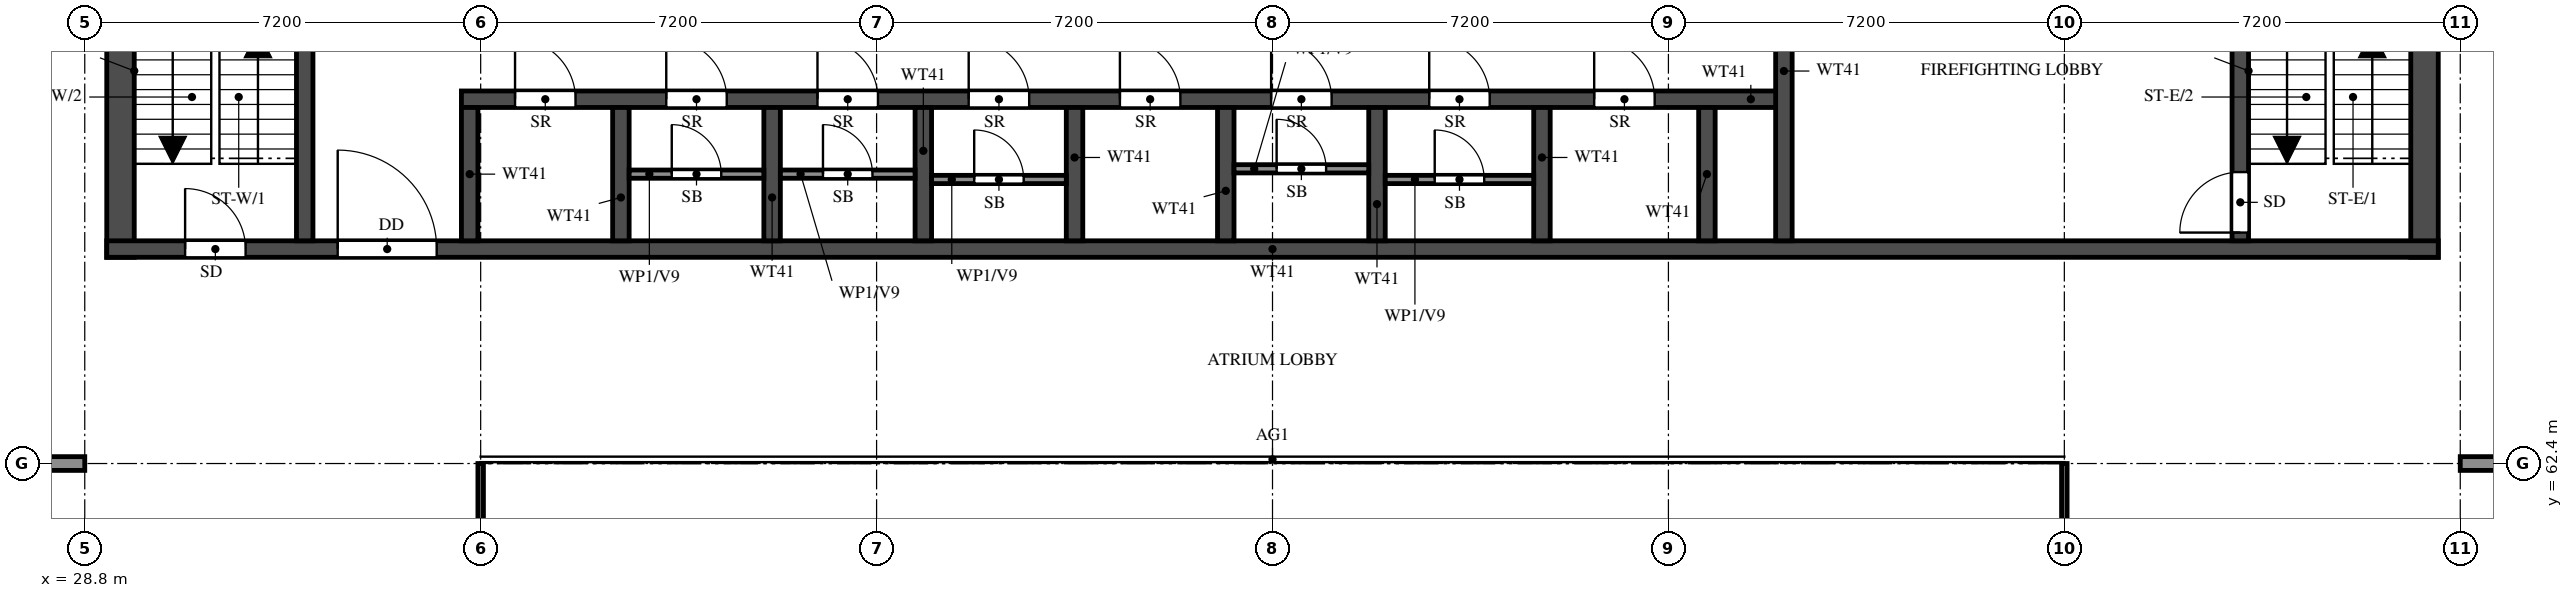
"""IFC4 building model, lengths in metres.
Left out: names, types, materials, properties, quantities, classifications, styles, units other than length and angle.
Written with IfcOpenShell. Run it as: python <this file> out.ifc"""

import sys

from ifc_helpers import new_model, si_unit, direction, frame, frame_2d, origin, place, context, subcontext, project, spatial, rectangle, extrude, element, fill, save


model = new_model("IFC4")
c1 = context("Model", 3, precision=1e-05, world=origin(), true_north=direction((0.0, 1.0)))
c2 = subcontext(c1, "Body", "Model", "MODEL_VIEW")
j1 = project(units=[si_unit("LENGTHUNIT", "METRE"), si_unit("PLANEANGLEUNIT", "RADIAN")], contexts=[c1])
p1 = place(None, origin())
s1 = spatial("IfcSite", under=j1, at=p1, CompositionType="ELEMENT")
p2 = place(p1, origin())
s2 = spatial("IfcBuilding", under=s1, at=p2, CompositionType="ELEMENT")
p3 = place(p2, frame((0.0, 0.0, 271.0)))
s3 = spatial("IfcBuildingStorey", under=s2, at=p3, CompositionType="ELEMENT", Elevation=271.0)
for number, where, z_axis, x_axis in (
    (1, (29.45, 66.15, 0.0), (0.0, 0.0, 1.0), (0.0, 1.0, 0.0)),
    (2, (71.35, 66.15, 0.0), (0.0, 0.0, 1.0), (0.0, 1.0, 0.0)),
):
    element("IfcWall", number, at=place(p3, frame(where, z_axis=z_axis, x_axis=x_axis)), inside=s3, PredefinedType="SHEAR", context=c2, shape_type="SweptSolid", body=[
        extrude(rectangle(XDim=11.85, YDim=0.5, at=frame_2d((5.925, 0.0))), origin(), (0.0, 0.0, 1.0), 3.15),
    ])
p4 = place(p3, frame((29.2, 66.3, 0.0), z_axis=(0.0, 0.0, 1.0), x_axis=(1.0, 0.0, 0.0)))
e3 = element("IfcWall", 3, at=p4, inside=s3, PredefinedType="SHEAR", context=c2, shape_type="SweptSolid", body=[
    extrude(rectangle(XDim=42.4, YDim=0.3, at=frame_2d((21.2, 0.0))), origin(), (0.0, 0.0, 1.0), 3.15),
])
p5 = place(p4, frame((1.425, 0.0, 0.0)))
e4 = element("IfcOpeningElement", 4, at=p5, cuts=e3, PredefinedType="OPENING", context=c2, shape_type="SweptSolid", body=[
    extrude(rectangle(XDim=1.1, YDim=2.1, at=frame_2d((0.55, 1.05))), frame((0.0, 0.16, 0.0), z_axis=(0.0, -1.0, 0.0), x_axis=(1.0, 0.0, 0.0)), (0.0, 0.0, 1.0), 0.32),
])
p6 = place(p4, frame((4.2, 0.0, 0.0)))
e5 = element("IfcOpeningElement", 5, at=p6, cuts=e3, PredefinedType="OPENING", context=c2, shape_type="SweptSolid", body=[
    extrude(rectangle(XDim=1.8, YDim=2.1, at=frame_2d((0.9, 1.05))), frame((0.0, 0.16, 0.0), z_axis=(0.0, -1.0, 0.0), x_axis=(1.0, 0.0, 0.0)), (0.0, 0.0, 1.0), 0.32),
])
p7 = place(p3, frame((35.65, 69.025, 0.0), z_axis=(0.0, 0.0, 1.0), x_axis=(1.0, 0.0, 0.0)))
e6 = element("IfcWall", 6, at=p7, inside=s3, PredefinedType="SHEAR", context=c2, shape_type="SweptSolid", body=[
    extrude(rectangle(XDim=24.05, YDim=0.3, at=frame_2d((12.025, 0.0))), origin(), (0.0, 0.0, 1.0), 3.15),
])
p8 = place(p7, frame((0.975, 0.0, 0.0)))
e7 = element("IfcOpeningElement", 7, at=p8, cuts=e6, PredefinedType="OPENING", context=c2, shape_type="SweptSolid", body=[
    extrude(rectangle(XDim=1.1, YDim=2.1, at=frame_2d((0.55, 1.05))), frame((0.0, 0.16, 0.0), z_axis=(0.0, -1.0, 0.0), x_axis=(1.0, 0.0, 0.0)), (0.0, 0.0, 1.0), 0.32),
])
p9 = place(p7, frame((3.725, 0.0, 0.0)))
e8 = element("IfcOpeningElement", 8, at=p9, cuts=e6, PredefinedType="OPENING", context=c2, shape_type="SweptSolid", body=[
    extrude(rectangle(XDim=1.1, YDim=2.1, at=frame_2d((0.55, 1.05))), frame((0.0, 0.16, 0.0), z_axis=(0.0, -1.0, 0.0), x_axis=(1.0, 0.0, 0.0)), (0.0, 0.0, 1.0), 0.32),
])
p10 = place(p7, frame((6.475, 0.0, 0.0)))
e9 = element("IfcOpeningElement", 9, at=p10, cuts=e6, PredefinedType="OPENING", context=c2, shape_type="SweptSolid", body=[
    extrude(rectangle(XDim=1.1, YDim=2.1, at=frame_2d((0.55, 1.05))), frame((0.0, 0.16, 0.0), z_axis=(0.0, -1.0, 0.0), x_axis=(1.0, 0.0, 0.0)), (0.0, 0.0, 1.0), 0.32),
])
p11 = place(p7, frame((9.225, 0.0, 0.0)))
e10 = element("IfcOpeningElement", 10, at=p11, cuts=e6, PredefinedType="OPENING", context=c2, shape_type="SweptSolid", body=[
    extrude(rectangle(XDim=1.1, YDim=2.1, at=frame_2d((0.55, 1.05))), frame((0.0, 0.16, 0.0), z_axis=(0.0, -1.0, 0.0), x_axis=(1.0, 0.0, 0.0)), (0.0, 0.0, 1.0), 0.32),
])
p12 = place(p7, frame((11.975, 0.0, 0.0)))
e11 = element("IfcOpeningElement", 11, at=p12, cuts=e6, PredefinedType="OPENING", context=c2, shape_type="SweptSolid", body=[
    extrude(rectangle(XDim=1.1, YDim=2.1, at=frame_2d((0.55, 1.05))), frame((0.0, 0.16, 0.0), z_axis=(0.0, -1.0, 0.0), x_axis=(1.0, 0.0, 0.0)), (0.0, 0.0, 1.0), 0.32),
])
p13 = place(p7, frame((14.725, 0.0, 0.0)))
e12 = element("IfcOpeningElement", 12, at=p13, cuts=e6, PredefinedType="OPENING", context=c2, shape_type="SweptSolid", body=[
    extrude(rectangle(XDim=1.1, YDim=2.1, at=frame_2d((0.55, 1.05))), frame((0.0, 0.16, 0.0), z_axis=(0.0, -1.0, 0.0), x_axis=(1.0, 0.0, 0.0)), (0.0, 0.0, 1.0), 0.32),
])
p14 = place(p7, frame((17.6, 0.0, 0.0)))
e13 = element("IfcOpeningElement", 13, at=p14, cuts=e6, PredefinedType="OPENING", context=c2, shape_type="SweptSolid", body=[
    extrude(rectangle(XDim=1.1, YDim=2.1, at=frame_2d((0.55, 1.05))), frame((0.0, 0.16, 0.0), z_axis=(0.0, -1.0, 0.0), x_axis=(1.0, 0.0, 0.0)), (0.0, 0.0, 1.0), 0.32),
])
p15 = place(p7, frame((20.6, 0.0, 0.0)))
e14 = element("IfcOpeningElement", 14, at=p15, cuts=e6, PredefinedType="OPENING", context=c2, shape_type="SweptSolid", body=[
    extrude(rectangle(XDim=1.1, YDim=2.1, at=frame_2d((0.55, 1.05))), frame((0.0, 0.16, 0.0), z_axis=(0.0, -1.0, 0.0), x_axis=(1.0, 0.0, 0.0)), (0.0, 0.0, 1.0), 0.32),
])
p16 = place(p3, frame((32.8, 66.45, 0.0), z_axis=(0.0, 0.0, 1.0), x_axis=(0.0, 1.0, 0.0)))
e15 = element("IfcWall", 15, at=p16, inside=s3, PredefinedType="SHEAR", context=c2, shape_type="SweptSolid", body=[
    extrude(rectangle(XDim=11.05, YDim=0.3, at=frame_2d((5.525, 0.0))), origin(), (0.0, 0.0, 1.0), 3.15),
])
p17 = place(p3, frame((68.0, 66.45, 0.0), z_axis=(0.0, 0.0, 1.0), x_axis=(0.0, 1.0, 0.0)))
e16 = element("IfcWall", 16, at=p17, inside=s3, PredefinedType="SHEAR", context=c2, shape_type="SweptSolid", body=[
    extrude(rectangle(XDim=11.05, YDim=0.3, at=frame_2d((5.525, 0.0))), origin(), (0.0, 0.0, 1.0), 3.15),
])
p18 = place(p17, frame((0.15, 0.0, 0.0)))
e17 = element("IfcOpeningElement", 17, at=p18, cuts=e16, PredefinedType="OPENING", context=c2, shape_type="SweptSolid", body=[
    extrude(rectangle(XDim=1.1, YDim=2.1, at=frame_2d((0.55, 1.05))), frame((0.0, 0.16, 0.0), z_axis=(0.0, -1.0, 0.0), x_axis=(1.0, 0.0, 0.0)), (0.0, 0.0, 1.0), 0.32),
])
p19 = place(p3, frame((59.7, 66.45, 0.0), z_axis=(0.0, 0.0, 1.0), x_axis=(0.0, 1.0, 0.0)))
e18 = element("IfcWall", 18, at=p19, inside=s3, PredefinedType="SHEAR", context=c2, shape_type="SweptSolid", body=[
    extrude(rectangle(XDim=6.175, YDim=0.3, at=frame_2d((3.087, 0.0))), origin(), (0.0, 0.0, 1.0), 3.15),
])
p20 = place(p19, frame((3.85, 0.0, 0.0)))
e19 = element("IfcOpeningElement", 19, at=p20, cuts=e18, PredefinedType="OPENING", context=c2, shape_type="SweptSolid", body=[
    extrude(rectangle(XDim=1.2, YDim=2.1, at=frame_2d((0.6, 1.05))), frame((0.0, 0.16, 0.0), z_axis=(0.0, -1.0, 0.0), x_axis=(1.0, 0.0, 0.0)), (0.0, 0.0, 1.0), 0.32),
])
for number, where, z_axis, x_axis in (
    (20, (35.8, 66.45, 0.0), (0.0, 0.0, 1.0), (0.0, 1.0, 0.0)),
    (21, (38.55, 66.45, 0.0), (0.0, 0.0, 1.0), (0.0, 1.0, 0.0)),
    (22, (41.3, 66.45, 0.0), (0.0, 0.0, 1.0), (0.0, 1.0, 0.0)),
    (23, (44.05, 66.45, 0.0), (0.0, 0.0, 1.0), (0.0, 1.0, 0.0)),
    (24, (46.8, 66.45, 0.0), (0.0, 0.0, 1.0), (0.0, 1.0, 0.0)),
    (25, (49.55, 66.45, 0.0), (0.0, 0.0, 1.0), (0.0, 1.0, 0.0)),
    (26, (52.3, 66.45, 0.0), (0.0, 0.0, 1.0), (0.0, 1.0, 0.0)),
    (27, (55.3, 66.45, 0.0), (0.0, 0.0, 1.0), (0.0, 1.0, 0.0)),
    (28, (58.3, 66.45, 0.0), (0.0, 0.0, 1.0), (0.0, 1.0, 0.0)),
):
    element("IfcWall", number, at=place(p3, frame(where, z_axis=z_axis, x_axis=x_axis)), inside=s3, PredefinedType="SHEAR", context=c2, shape_type="SweptSolid", body=[
        extrude(rectangle(XDim=2.425, YDim=0.3, at=frame_2d((1.212, 0.0))), origin(), (0.0, 0.0, 1.0), 3.15),
    ])
p21 = place(p3, frame((38.7, 67.663, 0.0), z_axis=(0.0, 0.0, 1.0), x_axis=(1.0, 0.0, 0.0)))
e29 = element("IfcWall", 29, at=p21, inside=s3, PredefinedType="PARTITIONING", context=c2, shape_type="SweptSolid", body=[
    extrude(rectangle(XDim=2.45, YDim=0.15, at=frame_2d((1.225, 0.0))), origin(), (0.0, 0.0, 1.0), 3.15),
])
p22 = place(p21, frame((0.775, 0.0, 0.0)))
e30 = element("IfcOpeningElement", 30, at=p22, cuts=e29, PredefinedType="OPENING", context=c2, shape_type="SweptSolid", body=[
    extrude(rectangle(XDim=0.9, YDim=2.1, at=frame_2d((0.45, 1.05))), frame((0.0, 0.085, 0.0), z_axis=(0.0, -1.0, 0.0), x_axis=(1.0, 0.0, 0.0)), (0.0, 0.0, 1.0), 0.17),
])
p23 = place(p3, frame((41.45, 67.663, 0.0), z_axis=(0.0, 0.0, 1.0), x_axis=(1.0, 0.0, 0.0)))
e31 = element("IfcWall", 31, at=p23, inside=s3, PredefinedType="PARTITIONING", context=c2, shape_type="SweptSolid", body=[
    extrude(rectangle(XDim=2.45, YDim=0.15, at=frame_2d((1.225, 0.0))), origin(), (0.0, 0.0, 1.0), 3.15),
])
p24 = place(p23, frame((0.775, 0.0, 0.0)))
e32 = element("IfcOpeningElement", 32, at=p24, cuts=e31, PredefinedType="OPENING", context=c2, shape_type="SweptSolid", body=[
    extrude(rectangle(XDim=0.9, YDim=2.1, at=frame_2d((0.45, 1.05))), frame((0.0, 0.085, 0.0), z_axis=(0.0, -1.0, 0.0), x_axis=(1.0, 0.0, 0.0)), (0.0, 0.0, 1.0), 0.17),
])
p25 = place(p3, frame((44.2, 67.565, 0.0), z_axis=(0.0, 0.0, 1.0), x_axis=(1.0, 0.0, 0.0)))
e33 = element("IfcWall", 33, at=p25, inside=s3, PredefinedType="PARTITIONING", context=c2, shape_type="SweptSolid", body=[
    extrude(rectangle(XDim=2.45, YDim=0.15, at=frame_2d((1.225, 0.0))), origin(), (0.0, 0.0, 1.0), 3.15),
])
p26 = place(p25, frame((0.775, 0.0, 0.0)))
e34 = element("IfcOpeningElement", 34, at=p26, cuts=e33, PredefinedType="OPENING", context=c2, shape_type="SweptSolid", body=[
    extrude(rectangle(XDim=0.9, YDim=2.1, at=frame_2d((0.45, 1.05))), frame((0.0, 0.085, 0.0), z_axis=(0.0, -1.0, 0.0), x_axis=(1.0, 0.0, 0.0)), (0.0, 0.0, 1.0), 0.17),
])
p27 = place(p3, frame((49.7, 67.76, 0.0), z_axis=(0.0, 0.0, 1.0), x_axis=(1.0, 0.0, 0.0)))
e35 = element("IfcWall", 35, at=p27, inside=s3, PredefinedType="PARTITIONING", context=c2, shape_type="SweptSolid", body=[
    extrude(rectangle(XDim=2.45, YDim=0.15, at=frame_2d((1.225, 0.0))), origin(), (0.0, 0.0, 1.0), 3.15),
])
p28 = place(p27, frame((0.775, 0.0, 0.0)))
e36 = element("IfcOpeningElement", 36, at=p28, cuts=e35, PredefinedType="OPENING", context=c2, shape_type="SweptSolid", body=[
    extrude(rectangle(XDim=0.9, YDim=2.1, at=frame_2d((0.45, 1.05))), frame((0.0, 0.085, 0.0), z_axis=(0.0, -1.0, 0.0), x_axis=(1.0, 0.0, 0.0)), (0.0, 0.0, 1.0), 0.17),
])
p29 = place(p3, frame((52.45, 67.565, 0.0), z_axis=(0.0, 0.0, 1.0), x_axis=(1.0, 0.0, 0.0)))
e37 = element("IfcWall", 37, at=p29, inside=s3, PredefinedType="PARTITIONING", context=c2, shape_type="SweptSolid", body=[
    extrude(rectangle(XDim=2.7, YDim=0.15, at=frame_2d((1.35, 0.0))), origin(), (0.0, 0.0, 1.0), 3.15),
])
p30 = place(p29, frame((0.9, 0.0, 0.0)))
e38 = element("IfcOpeningElement", 38, at=p30, cuts=e37, PredefinedType="OPENING", context=c2, shape_type="SweptSolid", body=[
    extrude(rectangle(XDim=0.9, YDim=2.1, at=frame_2d((0.45, 1.05))), frame((0.0, 0.085, 0.0), z_axis=(0.0, -1.0, 0.0), x_axis=(1.0, 0.0, 0.0)), (0.0, 0.0, 1.0), 0.17),
])
p31 = place(p3, frame((18.57, 62.4, 0.0), z_axis=(0.0, 0.0, 1.0), x_axis=(1.0, 0.0, 0.0)))
e39 = element("IfcWall", 39, at=p31, inside=s3, PredefinedType="SOLIDWALL", context=c2, shape_type="SweptSolid", body=[
    extrude(rectangle(XDim=10.23, YDim=0.25, at=frame_2d((5.115, 0.0))), origin(), (0.0, 0.0, 1.0), 3.15),
])
p32 = place(p31, frame((4.48, 0.0, 0.0)))
e40 = element("IfcOpeningElement", 40, at=p32, cuts=e39, PredefinedType="OPENING", context=c2, shape_type="SweptSolid", body=[
    extrude(rectangle(XDim=1.1, YDim=2.1, at=frame_2d((0.55, 1.05))), frame((0.0, 0.135, 0.0), z_axis=(0.0, -1.0, 0.0), x_axis=(1.0, 0.0, 0.0)), (0.0, 0.0, 1.0), 0.27),
])
p33 = place(p3, frame((72.0, 62.4, 0.0), z_axis=(0.0, 0.0, 1.0), x_axis=(1.0, 0.0, 0.0)))
e41 = element("IfcWall", 41, at=p33, inside=s3, PredefinedType="SOLIDWALL", context=c2, shape_type="SweptSolid", body=[
    extrude(rectangle(XDim=10.23, YDim=0.25, at=frame_2d((5.115, 0.0))), origin(), (0.0, 0.0, 1.0), 3.15),
])
p34 = place(p33, frame((4.65, 0.0, 0.0)))
e42 = element("IfcOpeningElement", 42, at=p34, cuts=e41, PredefinedType="OPENING", context=c2, shape_type="SweptSolid", body=[
    extrude(rectangle(XDim=1.1, YDim=2.1, at=frame_2d((0.55, 1.05))), frame((0.0, 0.135, 0.0), z_axis=(0.0, -1.0, 0.0), x_axis=(1.0, 0.0, 0.0)), (0.0, 0.0, 1.0), 0.27),
])
for number, where, z_axis, x_axis in (
    (43, (36.0, 48.0, 0.0), (0.0, 0.0, 1.0), (0.0, 1.0, 0.0)),
    (44, (64.8, 48.0, 0.0), (0.0, 0.0, 1.0), (0.0, 1.0, 0.0)),
):
    element("IfcWall", number, at=place(p3, frame(where, z_axis=z_axis, x_axis=x_axis)), inside=s3, PredefinedType="PARTITIONING", context=c2, shape_type="SweptSolid", body=[
        extrude(rectangle(XDim=14.4, YDim=0.1, at=frame_2d((7.2, 0.0))), origin(), (0.0, 0.0, 1.0), 2.25),
    ])
p35 = place(p5, origin())
e45 = element("IfcDoor", 45, at=p35, inside=s3, OperationType="SINGLE_SWING_LEFT", PredefinedType="DOOR", context=c2, shape_type="SweptSolid", body=[
    extrude(rectangle(XDim=1.1, YDim=2.1, at=frame_2d((0.55, 1.05))), frame((0.0, 0.025, 0.0), z_axis=(0.0, -1.0, 0.0), x_axis=(1.0, 0.0, 0.0)), (0.0, 0.0, 1.0), 0.05),
])
fill(e4, e45)
p36 = place(p18, origin())
e46 = element("IfcDoor", 46, at=p36, inside=s3, OperationType="SINGLE_SWING_RIGHT", PredefinedType="DOOR", context=c2, shape_type="SweptSolid", body=[
    extrude(rectangle(XDim=1.1, YDim=2.1, at=frame_2d((0.55, 1.05))), frame((0.0, 0.025, 0.0), z_axis=(0.0, -1.0, 0.0), x_axis=(1.0, 0.0, 0.0)), (0.0, 0.0, 1.0), 0.05),
])
fill(e17, e46)
p37 = place(p6, origin())
e47 = element("IfcDoor", 47, at=p37, inside=s3, OperationType="DOUBLE_DOOR_SINGLE_SWING", PredefinedType="DOOR", context=c2, shape_type="SweptSolid", body=[
    extrude(rectangle(XDim=1.8, YDim=2.1, at=frame_2d((0.9, 1.05))), frame((0.0, 0.025, 0.0), z_axis=(0.0, -1.0, 0.0), x_axis=(1.0, 0.0, 0.0)), (0.0, 0.0, 1.0), 0.05),
])
fill(e5, e47)
p38 = place(p8, origin())
e48 = element("IfcDoor", 48, at=p38, inside=s3, OperationType="SINGLE_SWING_RIGHT", PredefinedType="DOOR", context=c2, shape_type="SweptSolid", body=[
    extrude(rectangle(XDim=1.1, YDim=2.1, at=frame_2d((0.55, 1.05))), frame((0.0, 0.025, 0.0), z_axis=(0.0, -1.0, 0.0), x_axis=(1.0, 0.0, 0.0)), (0.0, 0.0, 1.0), 0.05),
])
fill(e7, e48)
p39 = place(p9, origin())
e49 = element("IfcDoor", 49, at=p39, inside=s3, OperationType="SINGLE_SWING_LEFT", PredefinedType="DOOR", context=c2, shape_type="SweptSolid", body=[
    extrude(rectangle(XDim=1.1, YDim=2.1, at=frame_2d((0.55, 1.05))), frame((0.0, 0.025, 0.0), z_axis=(0.0, -1.0, 0.0), x_axis=(1.0, 0.0, 0.0)), (0.0, 0.0, 1.0), 0.05),
])
fill(e8, e49)
p40 = place(p22, origin())
e50 = element("IfcDoor", 50, at=p40, inside=s3, OperationType="SINGLE_SWING_LEFT", PredefinedType="DOOR", context=c2, shape_type="SweptSolid", body=[
    extrude(rectangle(XDim=0.9, YDim=2.1, at=frame_2d((0.45, 1.05))), frame((0.0, 0.025, 0.0), z_axis=(0.0, -1.0, 0.0), x_axis=(1.0, 0.0, 0.0)), (0.0, 0.0, 1.0), 0.05),
])
fill(e30, e50)
p41 = place(p10, origin())
e51 = element("IfcDoor", 51, at=p41, inside=s3, OperationType="SINGLE_SWING_RIGHT", PredefinedType="DOOR", context=c2, shape_type="SweptSolid", body=[
    extrude(rectangle(XDim=1.1, YDim=2.1, at=frame_2d((0.55, 1.05))), frame((0.0, 0.025, 0.0), z_axis=(0.0, -1.0, 0.0), x_axis=(1.0, 0.0, 0.0)), (0.0, 0.0, 1.0), 0.05),
])
fill(e9, e51)
p42 = place(p24, origin())
e52 = element("IfcDoor", 52, at=p42, inside=s3, OperationType="SINGLE_SWING_RIGHT", PredefinedType="DOOR", context=c2, shape_type="SweptSolid", body=[
    extrude(rectangle(XDim=0.9, YDim=2.1, at=frame_2d((0.45, 1.05))), frame((0.0, 0.025, 0.0), z_axis=(0.0, -1.0, 0.0), x_axis=(1.0, 0.0, 0.0)), (0.0, 0.0, 1.0), 0.05),
])
fill(e32, e52)
p43 = place(p11, origin())
e53 = element("IfcDoor", 53, at=p43, inside=s3, OperationType="SINGLE_SWING_LEFT", PredefinedType="DOOR", context=c2, shape_type="SweptSolid", body=[
    extrude(rectangle(XDim=1.1, YDim=2.1, at=frame_2d((0.55, 1.05))), frame((0.0, 0.025, 0.0), z_axis=(0.0, -1.0, 0.0), x_axis=(1.0, 0.0, 0.0)), (0.0, 0.0, 1.0), 0.05),
])
fill(e10, e53)
p44 = place(p26, origin())
e54 = element("IfcDoor", 54, at=p44, inside=s3, OperationType="SINGLE_SWING_LEFT", PredefinedType="DOOR", context=c2, shape_type="SweptSolid", body=[
    extrude(rectangle(XDim=0.9, YDim=2.1, at=frame_2d((0.45, 1.05))), frame((0.0, 0.025, 0.0), z_axis=(0.0, -1.0, 0.0), x_axis=(1.0, 0.0, 0.0)), (0.0, 0.0, 1.0), 0.05),
])
fill(e34, e54)
p45 = place(p12, origin())
e55 = element("IfcDoor", 55, at=p45, inside=s3, OperationType="SINGLE_SWING_RIGHT", PredefinedType="DOOR", context=c2, shape_type="SweptSolid", body=[
    extrude(rectangle(XDim=1.1, YDim=2.1, at=frame_2d((0.55, 1.05))), frame((0.0, 0.025, 0.0), z_axis=(0.0, -1.0, 0.0), x_axis=(1.0, 0.0, 0.0)), (0.0, 0.0, 1.0), 0.05),
])
fill(e11, e55)
p46 = place(p13, origin())
e56 = element("IfcDoor", 56, at=p46, inside=s3, OperationType="SINGLE_SWING_LEFT", PredefinedType="DOOR", context=c2, shape_type="SweptSolid", body=[
    extrude(rectangle(XDim=1.1, YDim=2.1, at=frame_2d((0.55, 1.05))), frame((0.0, 0.025, 0.0), z_axis=(0.0, -1.0, 0.0), x_axis=(1.0, 0.0, 0.0)), (0.0, 0.0, 1.0), 0.05),
])
fill(e12, e56)
p47 = place(p28, origin())
e57 = element("IfcDoor", 57, at=p47, inside=s3, OperationType="SINGLE_SWING_RIGHT", PredefinedType="DOOR", context=c2, shape_type="SweptSolid", body=[
    extrude(rectangle(XDim=0.9, YDim=2.1, at=frame_2d((0.45, 1.05))), frame((0.0, 0.025, 0.0), z_axis=(0.0, -1.0, 0.0), x_axis=(1.0, 0.0, 0.0)), (0.0, 0.0, 1.0), 0.05),
])
fill(e36, e57)
p48 = place(p14, origin())
e58 = element("IfcDoor", 58, at=p48, inside=s3, OperationType="SINGLE_SWING_RIGHT", PredefinedType="DOOR", context=c2, shape_type="SweptSolid", body=[
    extrude(rectangle(XDim=1.1, YDim=2.1, at=frame_2d((0.55, 1.05))), frame((0.0, 0.025, 0.0), z_axis=(0.0, -1.0, 0.0), x_axis=(1.0, 0.0, 0.0)), (0.0, 0.0, 1.0), 0.05),
])
fill(e13, e58)
p49 = place(p30, origin())
e59 = element("IfcDoor", 59, at=p49, inside=s3, OperationType="SINGLE_SWING_RIGHT", PredefinedType="DOOR", context=c2, shape_type="SweptSolid", body=[
    extrude(rectangle(XDim=0.9, YDim=2.1, at=frame_2d((0.45, 1.05))), frame((0.0, 0.025, 0.0), z_axis=(0.0, -1.0, 0.0), x_axis=(1.0, 0.0, 0.0)), (0.0, 0.0, 1.0), 0.05),
])
fill(e38, e59)
p50 = place(p15, origin())
e60 = element("IfcDoor", 60, at=p50, inside=s3, OperationType="SINGLE_SWING_RIGHT", PredefinedType="DOOR", context=c2, shape_type="SweptSolid", body=[
    extrude(rectangle(XDim=1.1, YDim=2.1, at=frame_2d((0.55, 1.05))), frame((0.0, 0.025, 0.0), z_axis=(0.0, -1.0, 0.0), x_axis=(1.0, 0.0, 0.0)), (0.0, 0.0, 1.0), 0.05),
])
fill(e14, e60)
save(model, sys.argv[1])
